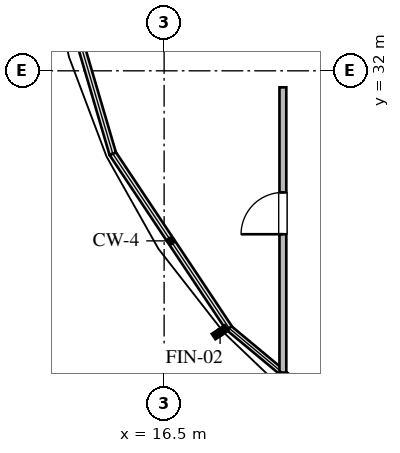
"""IFC4 building model, lengths in metres.
Left out: names, types, materials, properties, quantities, classifications, styles, units other than length and angle.
Written with IfcOpenShell. Run it as: python <this file> out.ifc"""

import sys

from ifc_helpers import new_model, si_unit, direction, frame, frame_2d, origin, place, context, subcontext, project, spatial, rectangle, extrude, element, fill, save


model = new_model("IFC4")
c1 = context("Model", 3, precision=1e-05, world=origin(), true_north=direction((0.0, 1.0)))
c2 = subcontext(c1, "Body", "Model", "MODEL_VIEW")
j1 = project(units=[si_unit("LENGTHUNIT", "METRE"), si_unit("PLANEANGLEUNIT", "RADIAN")], contexts=[c1])
p1 = place(None, origin())
s1 = spatial("IfcSite", under=j1, at=p1, CompositionType="ELEMENT")
p2 = place(p1, origin())
s2 = spatial("IfcBuilding", under=s1, at=p2, CompositionType="ELEMENT")
p3 = place(p2, frame((0.0, 0.0, 213.6)))
s3 = spatial("IfcBuildingStorey", under=s2, at=p3, CompositionType="ELEMENT", Elevation=213.6)
p4 = place(p3, frame((19.625, 24.06, 0.0), z_axis=(0.0, 0.0, 1.0), x_axis=(0.0, 1.0, 0.0)))
e1 = element("IfcWall", 1, at=p4, inside=s3, PredefinedType="PARTITIONING", context=c2, shape_type="SweptSolid", body=[
    extrude(rectangle(XDim=7.505, YDim=0.18, at=frame_2d((3.752, 0.0))), origin(), (0.0, 0.0, 1.0), 2.817),
])
p5 = place(p4, frame((3.64, 0.0, 0.0)))
e2 = element("IfcOpeningElement", 2, at=p5, cuts=e1, PredefinedType="OPENING", context=c2, shape_type="SweptSolid", body=[
    extrude(rectangle(XDim=1.1, YDim=2.1, at=frame_2d((0.55, 1.05))), frame((0.0, 0.1, 0.0), z_axis=(0.0, -1.0, 0.0), x_axis=(1.0, 0.0, 0.0)), (0.0, 0.0, 1.0), 0.2),
])
p6 = place(p5, origin())
e3 = element("IfcDoor", 3, at=p6, inside=s3, OperationType="SINGLE_SWING_LEFT", PredefinedType="DOOR", context=c2, shape_type="SweptSolid", body=[
    extrude(rectangle(XDim=1.1, YDim=2.1, at=frame_2d((0.55, 1.05))), frame((0.0, 0.025, 0.0), z_axis=(0.0, -1.0, 0.0), x_axis=(1.0, 0.0, 0.0)), (0.0, 0.0, 1.0), 0.05),
])
fill(e2, e3)
save(model, sys.argv[1])
